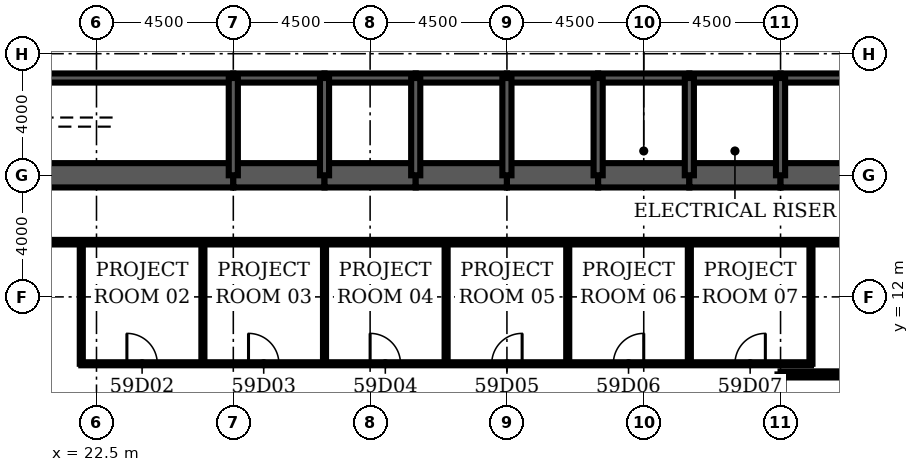
"""IFC4 building model, lengths in metres.
Left out: names, types, materials, properties, quantities, classifications, styles, units other than length and angle.
Written with IfcOpenShell. Run it as: python <this file> out.ifc"""

import sys

from ifc_helpers import new_model, si_unit, direction, frame, frame_2d, origin, place, context, subcontext, project, spatial, rectangle, extrude, element, fill, save


model = new_model("IFC4")
c1 = context("Model", 3, precision=1e-05, world=origin(), true_north=direction((0.0, 1.0)))
c2 = subcontext(c1, "Body", "Model", "MODEL_VIEW")
j1 = project(units=[si_unit("LENGTHUNIT", "METRE"), si_unit("PLANEANGLEUNIT", "RADIAN")], contexts=[c1])
p1 = place(None, origin())
s1 = spatial("IfcSite", under=j1, at=p1, CompositionType="ELEMENT")
p2 = place(p1, origin())
s2 = spatial("IfcBuilding", under=s1, at=p2, CompositionType="ELEMENT")
p3 = place(p2, frame((0.0, 0.0, 261.4)))
s3 = spatial("IfcBuildingStorey", under=s2, at=p3, CompositionType="ELEMENT", Elevation=261.4)
p4 = place(p3, frame((17.6, 16.0, 0.0), z_axis=(0.0, 0.0, 1.0), x_axis=(1.0, 0.0, 0.0)))
e1 = element("IfcWall", 1, at=p4, inside=s3, PredefinedType="SHEAR", context=c2, shape_type="SweptSolid", body=[
    extrude(rectangle(XDim=9.4, YDim=0.8, at=frame_2d((4.7, 0.0))), origin(), (0.0, 0.0, 1.0), 4.2),
])
for number, where, z_axis, x_axis in (
    (2, (27.0, 16.0, 0.0), (0.0, 0.0, 1.0), (1.0, 0.0, 0.0)),
    (3, (30.0, 16.0, 0.0), (0.0, 0.0, 1.0), (1.0, 0.0, 0.0)),
    (4, (33.0, 16.0, 0.0), (0.0, 0.0, 1.0), (1.0, 0.0, 0.0)),
    (5, (36.0, 16.0, 0.0), (0.0, 0.0, 1.0), (1.0, 0.0, 0.0)),
    (6, (39.0, 16.0, 0.0), (0.0, 0.0, 1.0), (1.0, 0.0, 0.0)),
    (7, (42.0, 16.0, 0.0), (0.0, 0.0, 1.0), (1.0, 0.0, 0.0)),
):
    element("IfcWall", number, at=place(p3, frame(where, z_axis=z_axis, x_axis=x_axis)), inside=s3, PredefinedType="SHEAR", context=c2, shape_type="SweptSolid", body=[
        extrude(rectangle(XDim=3.0, YDim=0.8, at=frame_2d((1.5, 0.0))), origin(), (0.0, 0.0, 1.0), 4.2),
    ])
p5 = place(p3, frame((45.0, 16.0, 0.0), z_axis=(0.0, 0.0, 1.0), x_axis=(1.0, 0.0, 0.0)))
e8 = element("IfcWall", 8, at=p5, inside=s3, PredefinedType="SHEAR", context=c2, shape_type="SweptSolid", body=[
    extrude(rectangle(XDim=9.4, YDim=0.8, at=frame_2d((4.7, 0.0))), origin(), (0.0, 0.0, 1.0), 4.2),
])
p6 = place(p3, frame((18.0, 19.2, 0.0), z_axis=(0.0, 0.0, 1.0), x_axis=(1.0, 0.0, 0.0)))
e9 = element("IfcWall", 9, at=p6, inside=s3, PredefinedType="SOLIDWALL", context=c2, shape_type="SweptSolid", body=[
    extrude(rectangle(XDim=9.0, YDim=0.3, at=frame_2d((4.5, 0.0))), origin(), (0.0, 0.0, 1.0), 4.2),
])
p7 = place(p6, frame((0.65, 0.0, 0.0)))
e10 = element("IfcOpeningElement", 10, at=p7, cuts=e9, PredefinedType="OPENING", context=c2, shape_type="SweptSolid", body=[
    extrude(rectangle(XDim=1.0, YDim=2.1, at=frame_2d((0.5, 1.05))), frame((0.0, 0.16, 0.0), z_axis=(0.0, -1.0, 0.0), x_axis=(1.0, 0.0, 0.0)), (0.0, 0.0, 1.0), 0.32),
])
p8 = place(p3, frame((27.0, 19.2, 0.0), z_axis=(0.0, 0.0, 1.0), x_axis=(1.0, 0.0, 0.0)))
e11 = element("IfcWall", 11, at=p8, inside=s3, PredefinedType="SOLIDWALL", context=c2, shape_type="SweptSolid", body=[
    extrude(rectangle(XDim=3.0, YDim=0.3, at=frame_2d((1.5, 0.0))), origin(), (0.0, 0.0, 1.0), 4.2),
])
p9 = place(p8, frame((0.95, 0.0, 0.0)))
e12 = element("IfcOpeningElement", 12, at=p9, cuts=e11, PredefinedType="OPENING", context=c2, shape_type="SweptSolid", body=[
    extrude(rectangle(XDim=1.1, YDim=2.2, at=frame_2d((0.55, 1.1))), frame((0.0, 0.16, 0.0), z_axis=(0.0, -1.0, 0.0), x_axis=(1.0, 0.0, 0.0)), (0.0, 0.0, 1.0), 0.32),
])
p10 = place(p3, frame((30.0, 19.2, 0.0), z_axis=(0.0, 0.0, 1.0), x_axis=(1.0, 0.0, 0.0)))
e13 = element("IfcWall", 13, at=p10, inside=s3, PredefinedType="SOLIDWALL", context=c2, shape_type="SweptSolid", body=[
    extrude(rectangle(XDim=3.0, YDim=0.3, at=frame_2d((1.5, 0.0))), origin(), (0.0, 0.0, 1.0), 4.2),
])
p11 = place(p10, frame((0.95, 0.0, 0.0)))
e14 = element("IfcOpeningElement", 14, at=p11, cuts=e13, PredefinedType="OPENING", context=c2, shape_type="SweptSolid", body=[
    extrude(rectangle(XDim=1.1, YDim=2.2, at=frame_2d((0.55, 1.1))), frame((0.0, 0.16, 0.0), z_axis=(0.0, -1.0, 0.0), x_axis=(1.0, 0.0, 0.0)), (0.0, 0.0, 1.0), 0.32),
])
p12 = place(p3, frame((33.0, 19.2, 0.0), z_axis=(0.0, 0.0, 1.0), x_axis=(1.0, 0.0, 0.0)))
e15 = element("IfcWall", 15, at=p12, inside=s3, PredefinedType="SOLIDWALL", context=c2, shape_type="SweptSolid", body=[
    extrude(rectangle(XDim=3.0, YDim=0.3, at=frame_2d((1.5, 0.0))), origin(), (0.0, 0.0, 1.0), 4.2),
])
p13 = place(p12, frame((0.95, 0.0, 0.0)))
e16 = element("IfcOpeningElement", 16, at=p13, cuts=e15, PredefinedType="OPENING", context=c2, shape_type="SweptSolid", body=[
    extrude(rectangle(XDim=1.1, YDim=2.2, at=frame_2d((0.55, 1.1))), frame((0.0, 0.16, 0.0), z_axis=(0.0, -1.0, 0.0), x_axis=(1.0, 0.0, 0.0)), (0.0, 0.0, 1.0), 0.32),
])
p14 = place(p3, frame((36.0, 19.2, 0.0), z_axis=(0.0, 0.0, 1.0), x_axis=(1.0, 0.0, 0.0)))
e17 = element("IfcWall", 17, at=p14, inside=s3, PredefinedType="SOLIDWALL", context=c2, shape_type="SweptSolid", body=[
    extrude(rectangle(XDim=3.0, YDim=0.3, at=frame_2d((1.5, 0.0))), origin(), (0.0, 0.0, 1.0), 4.2),
])
p15 = place(p14, frame((0.95, 0.0, 0.0)))
e18 = element("IfcOpeningElement", 18, at=p15, cuts=e17, PredefinedType="OPENING", context=c2, shape_type="SweptSolid", body=[
    extrude(rectangle(XDim=1.1, YDim=2.2, at=frame_2d((0.55, 1.1))), frame((0.0, 0.16, 0.0), z_axis=(0.0, -1.0, 0.0), x_axis=(1.0, 0.0, 0.0)), (0.0, 0.0, 1.0), 0.32),
])
p16 = place(p3, frame((39.0, 19.2, 0.0), z_axis=(0.0, 0.0, 1.0), x_axis=(1.0, 0.0, 0.0)))
e19 = element("IfcWall", 19, at=p16, inside=s3, PredefinedType="SOLIDWALL", context=c2, shape_type="SweptSolid", body=[
    extrude(rectangle(XDim=3.0, YDim=0.3, at=frame_2d((1.5, 0.0))), origin(), (0.0, 0.0, 1.0), 4.2),
])
p17 = place(p16, frame((1.0, 0.0, 0.0)))
e20 = element("IfcOpeningElement", 20, at=p17, cuts=e19, PredefinedType="OPENING", context=c2, shape_type="SweptSolid", body=[
    extrude(rectangle(XDim=1.0, YDim=2.1, at=frame_2d((0.5, 1.05))), frame((0.0, 0.16, 0.0), z_axis=(0.0, -1.0, 0.0), x_axis=(1.0, 0.0, 0.0)), (0.0, 0.0, 1.0), 0.32),
])
p18 = place(p3, frame((42.0, 19.2, 0.0), z_axis=(0.0, 0.0, 1.0), x_axis=(1.0, 0.0, 0.0)))
e21 = element("IfcWall", 21, at=p18, inside=s3, PredefinedType="SOLIDWALL", context=c2, shape_type="SweptSolid", body=[
    extrude(rectangle(XDim=3.0, YDim=0.3, at=frame_2d((1.5, 0.0))), origin(), (0.0, 0.0, 1.0), 4.2),
])
p19 = place(p18, frame((1.0, 0.0, 0.0)))
e22 = element("IfcOpeningElement", 22, at=p19, cuts=e21, PredefinedType="OPENING", context=c2, shape_type="SweptSolid", body=[
    extrude(rectangle(XDim=1.0, YDim=2.1, at=frame_2d((0.5, 1.05))), frame((0.0, 0.16, 0.0), z_axis=(0.0, -1.0, 0.0), x_axis=(1.0, 0.0, 0.0)), (0.0, 0.0, 1.0), 0.32),
])
p20 = place(p3, frame((45.0, 19.2, 0.0), z_axis=(0.0, 0.0, 1.0), x_axis=(1.0, 0.0, 0.0)))
e23 = element("IfcWall", 23, at=p20, inside=s3, PredefinedType="SOLIDWALL", context=c2, shape_type="SweptSolid", body=[
    extrude(rectangle(XDim=9.0, YDim=0.3, at=frame_2d((4.5, 0.0))), origin(), (0.0, 0.0, 1.0), 4.2),
])
p21 = place(p20, frame((7.35, 0.0, 0.0)))
e24 = element("IfcOpeningElement", 24, at=p21, cuts=e23, PredefinedType="OPENING", context=c2, shape_type="SweptSolid", body=[
    extrude(rectangle(XDim=1.0, YDim=2.1, at=frame_2d((0.5, 1.05))), frame((0.0, 0.16, 0.0), z_axis=(0.0, -1.0, 0.0), x_axis=(1.0, 0.0, 0.0)), (0.0, 0.0, 1.0), 0.32),
])
for number, where, z_axis, x_axis in (
    (25, (27.0, 16.0, 0.0), (0.0, 0.0, 1.0), (0.0, 1.0, 0.0)),
    (26, (30.0, 16.0, 0.0), (0.0, 0.0, 1.0), (0.0, 1.0, 0.0)),
    (27, (33.0, 16.0, 0.0), (0.0, 0.0, 1.0), (0.0, 1.0, 0.0)),
    (28, (36.0, 16.0, 0.0), (0.0, 0.0, 1.0), (0.0, 1.0, 0.0)),
    (29, (39.0, 16.0, 0.0), (0.0, 0.0, 1.0), (0.0, 1.0, 0.0)),
    (30, (42.0, 16.0, 0.0), (0.0, 0.0, 1.0), (0.0, 1.0, 0.0)),
    (31, (45.0, 16.0, 0.0), (0.0, 0.0, 1.0), (0.0, 1.0, 0.0)),
):
    element("IfcWall", number, at=place(p3, frame(where, z_axis=z_axis, x_axis=x_axis)), inside=s3, PredefinedType="SOLIDWALL", context=c2, shape_type="SweptSolid", body=[
        extrude(rectangle(XDim=3.2, YDim=0.3, at=frame_2d((1.6, 0.0))), origin(), (0.0, 0.0, 1.0), 4.2),
    ])
p22 = place(p3, frame((39.15, 17.35, 0.0), z_axis=(0.0, 0.0, 1.0), x_axis=(1.0, 0.0, 0.0)))
e32 = element("IfcWall", 32, at=p22, inside=s3, PredefinedType="SOLIDWALL", context=c2, shape_type="SweptSolid", body=[
    extrude(rectangle(XDim=2.7, YDim=0.3, at=frame_2d((1.35, 0.0))), origin(), (0.0, 0.0, 1.0), 3.95),
])
p23 = place(p22, frame((0.85, 0.0, 0.0)))
e33 = element("IfcOpeningElement", 33, at=p23, cuts=e32, PredefinedType="OPENING", context=c2, shape_type="SweptSolid", body=[
    extrude(rectangle(XDim=1.0, YDim=2.1, at=frame_2d((0.5, 1.05))), frame((0.0, 0.16, 0.0), z_axis=(0.0, -1.0, 0.0), x_axis=(1.0, 0.0, 0.0)), (0.0, 0.0, 1.0), 0.32),
])
p24 = place(p3, frame((42.15, 17.35, 0.0), z_axis=(0.0, 0.0, 1.0), x_axis=(1.0, 0.0, 0.0)))
e34 = element("IfcWall", 34, at=p24, inside=s3, PredefinedType="SOLIDWALL", context=c2, shape_type="SweptSolid", body=[
    extrude(rectangle(XDim=2.7, YDim=0.3, at=frame_2d((1.35, 0.0))), origin(), (0.0, 0.0, 1.0), 3.95),
])
p25 = place(p24, frame((0.85, 0.0, 0.0)))
e35 = element("IfcOpeningElement", 35, at=p25, cuts=e34, PredefinedType="OPENING", context=c2, shape_type="SweptSolid", body=[
    extrude(rectangle(XDim=1.0, YDim=2.1, at=frame_2d((0.5, 1.05))), frame((0.0, 0.16, 0.0), z_axis=(0.0, -1.0, 0.0), x_axis=(1.0, 0.0, 0.0)), (0.0, 0.0, 1.0), 0.32),
])
p26 = place(p3, frame((45.0, 9.45, 0.0), z_axis=(0.0, 0.0, 1.0), x_axis=(1.0, 0.0, 0.0)))
e36 = element("IfcWall", 36, at=p26, inside=s3, PredefinedType="PARTITIONING", context=c2, shape_type="SweptSolid", body=[
    extrude(rectangle(XDim=18.0, YDim=0.2, at=frame_2d((9.0, 0.0))), origin(), (0.0, 0.0, 1.0), 3.0),
])
p27 = place(p26, frame((8.2, 0.0, 0.0)))
e37 = element("IfcOpeningElement", 37, at=p27, cuts=e36, PredefinedType="OPENING", context=c2, shape_type="SweptSolid", body=[
    extrude(rectangle(XDim=1.6, YDim=2.1, at=frame_2d((0.8, 1.05))), frame((0.0, 0.11, 0.0), z_axis=(0.0, -1.0, 0.0), x_axis=(1.0, 0.0, 0.0)), (0.0, 0.0, 1.0), 0.22),
])
p28 = place(p3, frame((22.0, 9.8, 0.0), z_axis=(0.0, 0.0, 1.0), x_axis=(1.0, 0.0, 0.0)))
e38 = element("IfcWall", 38, at=p28, inside=s3, PredefinedType="PARTITIONING", context=c2, shape_type="SweptSolid", body=[
    extrude(rectangle(XDim=24.0, YDim=0.1, at=frame_2d((12.0, 0.0))), origin(), (0.0, 0.0, 1.0), 3.0),
])
p29 = place(p28, frame((1.5, 0.0, 0.0)))
e39 = element("IfcOpeningElement", 39, at=p29, cuts=e38, PredefinedType="OPENING", context=c2, shape_type="SweptSolid", body=[
    extrude(rectangle(XDim=1.0, YDim=2.1, at=frame_2d((0.5, 1.05))), frame((0.0, 0.06, 0.0), z_axis=(0.0, -1.0, 0.0), x_axis=(1.0, 0.0, 0.0)), (0.0, 0.0, 1.0), 0.12),
])
p30 = place(p28, frame((5.5, 0.0, 0.0)))
e40 = element("IfcOpeningElement", 40, at=p30, cuts=e38, PredefinedType="OPENING", context=c2, shape_type="SweptSolid", body=[
    extrude(rectangle(XDim=1.0, YDim=2.1, at=frame_2d((0.5, 1.05))), frame((0.0, 0.06, 0.0), z_axis=(0.0, -1.0, 0.0), x_axis=(1.0, 0.0, 0.0)), (0.0, 0.0, 1.0), 0.12),
])
p31 = place(p28, frame((9.5, 0.0, 0.0)))
e41 = element("IfcOpeningElement", 41, at=p31, cuts=e38, PredefinedType="OPENING", context=c2, shape_type="SweptSolid", body=[
    extrude(rectangle(XDim=1.0, YDim=2.1, at=frame_2d((0.5, 1.05))), frame((0.0, 0.06, 0.0), z_axis=(0.0, -1.0, 0.0), x_axis=(1.0, 0.0, 0.0)), (0.0, 0.0, 1.0), 0.12),
])
p32 = place(p28, frame((13.5, 0.0, 0.0)))
e42 = element("IfcOpeningElement", 42, at=p32, cuts=e38, PredefinedType="OPENING", context=c2, shape_type="SweptSolid", body=[
    extrude(rectangle(XDim=1.0, YDim=2.1, at=frame_2d((0.5, 1.05))), frame((0.0, 0.06, 0.0), z_axis=(0.0, -1.0, 0.0), x_axis=(1.0, 0.0, 0.0)), (0.0, 0.0, 1.0), 0.12),
])
p33 = place(p28, frame((17.5, 0.0, 0.0)))
e43 = element("IfcOpeningElement", 43, at=p33, cuts=e38, PredefinedType="OPENING", context=c2, shape_type="SweptSolid", body=[
    extrude(rectangle(XDim=1.0, YDim=2.1, at=frame_2d((0.5, 1.05))), frame((0.0, 0.06, 0.0), z_axis=(0.0, -1.0, 0.0), x_axis=(1.0, 0.0, 0.0)), (0.0, 0.0, 1.0), 0.12),
])
p34 = place(p28, frame((21.5, 0.0, 0.0)))
e44 = element("IfcOpeningElement", 44, at=p34, cuts=e38, PredefinedType="OPENING", context=c2, shape_type="SweptSolid", body=[
    extrude(rectangle(XDim=1.0, YDim=2.1, at=frame_2d((0.5, 1.05))), frame((0.0, 0.06, 0.0), z_axis=(0.0, -1.0, 0.0), x_axis=(1.0, 0.0, 0.0)), (0.0, 0.0, 1.0), 0.12),
])
p35 = place(p3, frame((15.2, 13.8, 0.0), z_axis=(0.0, 0.0, 1.0), x_axis=(1.0, 0.0, 0.0)))
e45 = element("IfcWall", 45, at=p35, inside=s3, PredefinedType="PARTITIONING", context=c2, shape_type="SweptSolid", body=[
    extrude(rectangle(XDim=41.6, YDim=0.15, at=frame_2d((20.8, 0.0))), origin(), (0.0, 0.0, 1.0), 3.0),
])
p36 = place(p35, frame((4.175, 0.0, 0.0)))
e46 = element("IfcOpeningElement", 46, at=p36, cuts=e45, PredefinedType="OPENING", context=c2, shape_type="SweptSolid", body=[
    extrude(rectangle(XDim=1.2, YDim=2.1, at=frame_2d((0.6, 1.05))), frame((0.0, 0.085, 0.0), z_axis=(0.0, -1.0, 0.0), x_axis=(1.0, 0.0, 0.0)), (0.0, 0.0, 1.0), 0.17),
])
p37 = place(p3, frame((22.0, 9.8, 0.0), z_axis=(0.0, 0.0, 1.0), x_axis=(0.0, 1.0, 0.0)))
e47 = element("IfcWall", 47, at=p37, inside=s3, PredefinedType="PARTITIONING", context=c2, shape_type="SweptSolid", body=[
    extrude(rectangle(XDim=4.0, YDim=0.1, at=frame_2d((2.0, 0.0))), origin(), (0.0, 0.0, 1.0), 3.0),
])
p38 = place(p3, frame((26.0, 9.8, 0.0), z_axis=(0.0, 0.0, 1.0), x_axis=(0.0, 1.0, 0.0)))
e48 = element("IfcWall", 48, at=p38, inside=s3, PredefinedType="PARTITIONING", context=c2, shape_type="SweptSolid", body=[
    extrude(rectangle(XDim=4.0, YDim=0.1, at=frame_2d((2.0, 0.0))), origin(), (0.0, 0.0, 1.0), 2.942),
])
for number, where, z_axis, x_axis in (
    (49, (30.0, 9.8, 0.0), (0.0, 0.0, 1.0), (0.0, 1.0, 0.0)),
    (50, (34.0, 9.8, 0.0), (0.0, 0.0, 1.0), (0.0, 1.0, 0.0)),
    (51, (38.0, 9.8, 0.0), (0.0, 0.0, 1.0), (0.0, 1.0, 0.0)),
    (52, (42.0, 9.8, 0.0), (0.0, 0.0, 1.0), (0.0, 1.0, 0.0)),
):
    element("IfcWall", number, at=place(p3, frame(where, z_axis=z_axis, x_axis=x_axis)), inside=s3, PredefinedType="PARTITIONING", context=c2, shape_type="SweptSolid", body=[
        extrude(rectangle(XDim=4.0, YDim=0.1, at=frame_2d((2.0, 0.0))), origin(), (0.0, 0.0, 1.0), 3.0),
    ])
p39 = place(p3, frame((45.0, 2.45, 0.0), z_axis=(0.0, 0.0, 1.0), x_axis=(0.0, 1.0, 0.0)))
e53 = element("IfcWall", 53, at=p39, inside=s3, PredefinedType="PARTITIONING", context=c2, shape_type="SweptSolid", body=[
    extrude(rectangle(XDim=7.0, YDim=0.2, at=frame_2d((3.5, 0.0))), origin(), (0.0, 0.0, 1.0), 3.0),
])
p40 = place(p3, frame((46.0, 9.8, 0.0), z_axis=(0.0, 0.0, 1.0), x_axis=(0.0, 1.0, 0.0)))
e54 = element("IfcWall", 54, at=p40, inside=s3, PredefinedType="PARTITIONING", context=c2, shape_type="SweptSolid", body=[
    extrude(rectangle(XDim=4.0, YDim=0.1, at=frame_2d((2.0, 0.0))), origin(), (0.0, 0.0, 1.0), 2.942),
])
p41 = place(p23, origin())
e55 = element("IfcDoor", 55, at=p41, inside=s3, OperationType="SINGLE_SWING_LEFT", PredefinedType="DOOR", context=c2, shape_type="SweptSolid", body=[
    extrude(rectangle(XDim=1.0, YDim=2.1, at=frame_2d((0.5, 1.05))), frame((0.0, 0.025, 0.0), z_axis=(0.0, -1.0, 0.0), x_axis=(1.0, 0.0, 0.0)), (0.0, 0.0, 1.0), 0.05),
])
fill(e33, e55)
p42 = place(p25, origin())
e56 = element("IfcDoor", 56, at=p42, inside=s3, OperationType="SINGLE_SWING_LEFT", PredefinedType="DOOR", context=c2, shape_type="SweptSolid", body=[
    extrude(rectangle(XDim=1.0, YDim=2.1, at=frame_2d((0.5, 1.05))), frame((0.0, 0.025, 0.0), z_axis=(0.0, -1.0, 0.0), x_axis=(1.0, 0.0, 0.0)), (0.0, 0.0, 1.0), 0.05),
])
fill(e35, e56)
p43 = place(p29, origin())
e57 = element("IfcDoor", 57, at=p43, inside=s3, OperationType="SINGLE_SWING_LEFT", PredefinedType="DOOR", context=c2, shape_type="SweptSolid", body=[
    extrude(rectangle(XDim=1.0, YDim=2.1, at=frame_2d((0.5, 1.05))), frame((0.0, 0.025, 0.0), z_axis=(0.0, -1.0, 0.0), x_axis=(1.0, 0.0, 0.0)), (0.0, 0.0, 1.0), 0.05),
])
fill(e39, e57)
p44 = place(p30, origin())
e58 = element("IfcDoor", 58, at=p44, inside=s3, OperationType="SINGLE_SWING_LEFT", PredefinedType="DOOR", context=c2, shape_type="SweptSolid", body=[
    extrude(rectangle(XDim=1.0, YDim=2.1, at=frame_2d((0.5, 1.05))), frame((0.0, 0.025, 0.0), z_axis=(0.0, -1.0, 0.0), x_axis=(1.0, 0.0, 0.0)), (0.0, 0.0, 1.0), 0.05),
])
fill(e40, e58)
p45 = place(p31, origin())
e59 = element("IfcDoor", 59, at=p45, inside=s3, OperationType="SINGLE_SWING_LEFT", PredefinedType="DOOR", context=c2, shape_type="SweptSolid", body=[
    extrude(rectangle(XDim=1.0, YDim=2.1, at=frame_2d((0.5, 1.05))), frame((0.0, 0.025, 0.0), z_axis=(0.0, -1.0, 0.0), x_axis=(1.0, 0.0, 0.0)), (0.0, 0.0, 1.0), 0.05),
])
fill(e41, e59)
p46 = place(p32, origin())
e60 = element("IfcDoor", 60, at=p46, inside=s3, OperationType="SINGLE_SWING_RIGHT", PredefinedType="DOOR", context=c2, shape_type="SweptSolid", body=[
    extrude(rectangle(XDim=1.0, YDim=2.1, at=frame_2d((0.5, 1.05))), frame((0.0, 0.025, 0.0), z_axis=(0.0, -1.0, 0.0), x_axis=(1.0, 0.0, 0.0)), (0.0, 0.0, 1.0), 0.05),
])
fill(e42, e60)
p47 = place(p33, origin())
e61 = element("IfcDoor", 61, at=p47, inside=s3, OperationType="SINGLE_SWING_RIGHT", PredefinedType="DOOR", context=c2, shape_type="SweptSolid", body=[
    extrude(rectangle(XDim=1.0, YDim=2.1, at=frame_2d((0.5, 1.05))), frame((0.0, 0.025, 0.0), z_axis=(0.0, -1.0, 0.0), x_axis=(1.0, 0.0, 0.0)), (0.0, 0.0, 1.0), 0.05),
])
fill(e43, e61)
p48 = place(p34, origin())
e62 = element("IfcDoor", 62, at=p48, inside=s3, OperationType="SINGLE_SWING_RIGHT", PredefinedType="DOOR", context=c2, shape_type="SweptSolid", body=[
    extrude(rectangle(XDim=1.0, YDim=2.1, at=frame_2d((0.5, 1.05))), frame((0.0, 0.025, 0.0), z_axis=(0.0, -1.0, 0.0), x_axis=(1.0, 0.0, 0.0)), (0.0, 0.0, 1.0), 0.05),
])
fill(e44, e62)
p49 = place(p9, origin())
e63 = element("IfcDoor", 63, at=p49, inside=s3, OperationType="DOUBLE_DOOR_SLIDING", PredefinedType="USERDEFINED", context=c2, shape_type="SweptSolid", body=[
    extrude(rectangle(XDim=1.1, YDim=2.2, at=frame_2d((0.55, 1.1))), frame((0.0, 0.025, 0.0), z_axis=(0.0, -1.0, 0.0), x_axis=(1.0, 0.0, 0.0)), (0.0, 0.0, 1.0), 0.05),
])
fill(e12, e63)
p50 = place(p11, origin())
e64 = element("IfcDoor", 64, at=p50, inside=s3, OperationType="DOUBLE_DOOR_SLIDING", PredefinedType="USERDEFINED", context=c2, shape_type="SweptSolid", body=[
    extrude(rectangle(XDim=1.1, YDim=2.2, at=frame_2d((0.55, 1.1))), frame((0.0, 0.025, 0.0), z_axis=(0.0, -1.0, 0.0), x_axis=(1.0, 0.0, 0.0)), (0.0, 0.0, 1.0), 0.05),
])
fill(e14, e64)
p51 = place(p13, origin())
e65 = element("IfcDoor", 65, at=p51, inside=s3, OperationType="DOUBLE_DOOR_SLIDING", PredefinedType="USERDEFINED", context=c2, shape_type="SweptSolid", body=[
    extrude(rectangle(XDim=1.1, YDim=2.2, at=frame_2d((0.55, 1.1))), frame((0.0, 0.025, 0.0), z_axis=(0.0, -1.0, 0.0), x_axis=(1.0, 0.0, 0.0)), (0.0, 0.0, 1.0), 0.05),
])
fill(e16, e65)
p52 = place(p15, origin())
e66 = element("IfcDoor", 66, at=p52, inside=s3, OperationType="DOUBLE_DOOR_SLIDING", PredefinedType="USERDEFINED", context=c2, shape_type="SweptSolid", body=[
    extrude(rectangle(XDim=1.1, YDim=2.2, at=frame_2d((0.55, 1.1))), frame((0.0, 0.025, 0.0), z_axis=(0.0, -1.0, 0.0), x_axis=(1.0, 0.0, 0.0)), (0.0, 0.0, 1.0), 0.05),
])
fill(e18, e66)
p53 = place(p17, origin())
e67 = element("IfcDoor", 67, at=p53, inside=s3, OperationType="SINGLE_SWING_LEFT", PredefinedType="DOOR", context=c2, shape_type="SweptSolid", body=[
    extrude(rectangle(XDim=1.0, YDim=2.1, at=frame_2d((0.5, 1.05))), frame((0.0, 0.025, 0.0), z_axis=(0.0, -1.0, 0.0), x_axis=(1.0, 0.0, 0.0)), (0.0, 0.0, 1.0), 0.05),
])
fill(e20, e67)
p54 = place(p19, origin())
e68 = element("IfcDoor", 68, at=p54, inside=s3, OperationType="SINGLE_SWING_LEFT", PredefinedType="DOOR", context=c2, shape_type="SweptSolid", body=[
    extrude(rectangle(XDim=1.0, YDim=2.1, at=frame_2d((0.5, 1.05))), frame((0.0, 0.025, 0.0), z_axis=(0.0, -1.0, 0.0), x_axis=(1.0, 0.0, 0.0)), (0.0, 0.0, 1.0), 0.05),
])
fill(e22, e68)
save(model, sys.argv[1])
